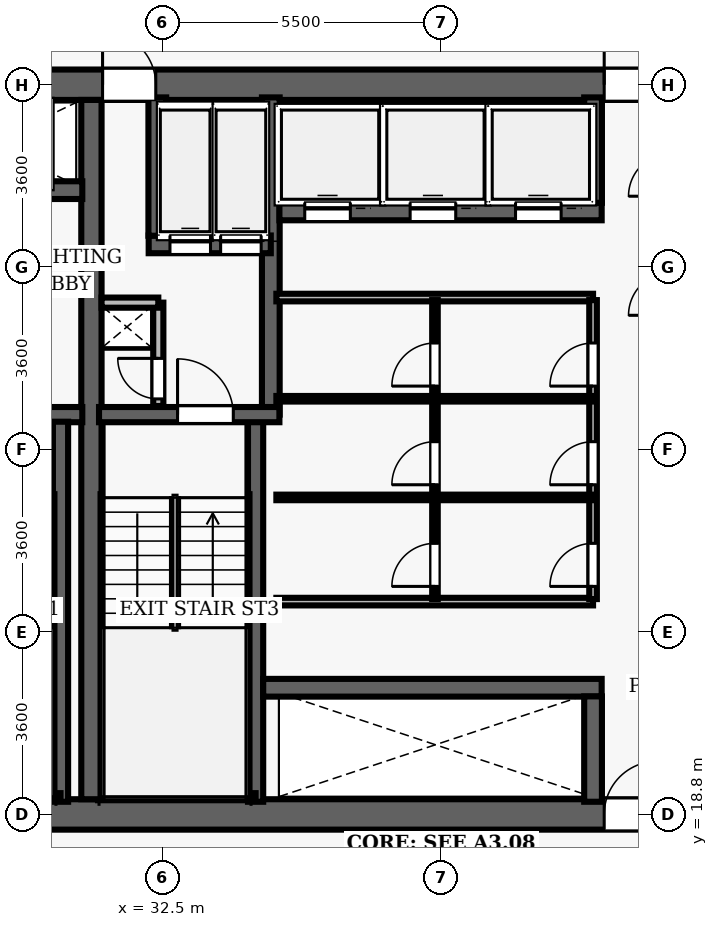
"""IFC4 building model, lengths in metres.
Left out: names, types, materials, properties, quantities, classifications, styles, units other than length and angle.
Written with IfcOpenShell. Run it as: python <this file> out.ifc"""

import sys

from ifc_helpers import new_model, si_unit, direction, frame, frame_2d, origin, place, context, subcontext, project, spatial, rectangle, extrude, element, fill, save


model = new_model("IFC4")
c1 = context("Model", 3, precision=1e-05, world=origin(), true_north=direction((0.0, 1.0)))
c2 = subcontext(c1, "Body", "Model", "MODEL_VIEW")
j1 = project(units=[si_unit("LENGTHUNIT", "METRE"), si_unit("PLANEANGLEUNIT", "RADIAN")], contexts=[c1])
p1 = place(None, origin())
s1 = spatial("IfcSite", under=j1, at=p1, CompositionType="ELEMENT")
p2 = place(p1, origin())
s2 = spatial("IfcBuilding", under=s1, at=p2, CompositionType="ELEMENT")
p3 = place(p2, frame((0.0, 0.0, 69.4)))
s3 = spatial("IfcBuildingStorey", under=s2, at=p3, CompositionType="ELEMENT", Elevation=69.4)
p4 = place(p3, frame((26.7, 18.8, 0.0), z_axis=(0.0, 0.0, 1.0), x_axis=(1.0, 0.0, 0.0)))
e1 = element("IfcWall", 1, at=p4, inside=s3, PredefinedType="SHEAR", context=c2, shape_type="SweptSolid", body=[
    extrude(rectangle(XDim=22.6, YDim=0.6, at=frame_2d((11.3, 0.0))), origin(), (0.0, 0.0, 1.0), 3.5),
])
p5 = place(p4, frame((14.52, 0.0, 0.0)))
e2 = element("IfcOpeningElement", 2, at=p5, cuts=e1, PredefinedType="OPENING", context=c2, shape_type="SweptSolid", body=[
    extrude(rectangle(XDim=1.05, YDim=2.15, at=frame_2d((0.525, 1.075))), frame((0.0, 0.31, 0.0), z_axis=(0.0, -1.0, 0.0), x_axis=(1.0, 0.0, 0.0)), (0.0, 0.0, 1.0), 0.62),
])
p6 = place(p3, frame((26.7, 33.2, 0.0), z_axis=(0.0, 0.0, 1.0), x_axis=(1.0, 0.0, 0.0)))
e3 = element("IfcWall", 3, at=p6, inside=s3, PredefinedType="SHEAR", context=c2, shape_type="SweptSolid", body=[
    extrude(rectangle(XDim=22.6, YDim=0.6, at=frame_2d((11.3, 0.0))), origin(), (0.0, 0.0, 1.0), 3.5),
])
p7 = place(p6, frame((4.62, 0.0, 0.0)))
e4 = element("IfcOpeningElement", 4, at=p7, cuts=e3, PredefinedType="OPENING", context=c2, shape_type="SweptSolid", body=[
    extrude(rectangle(XDim=1.05, YDim=2.15, at=frame_2d((0.525, 1.075))), frame((0.0, 0.31, 0.0), z_axis=(0.0, -1.0, 0.0), x_axis=(1.0, 0.0, 0.0)), (0.0, 0.0, 1.0), 0.62),
])
p8 = place(p6, frame((14.52, 0.0, 0.0)))
e5 = element("IfcOpeningElement", 5, at=p8, cuts=e3, PredefinedType="OPENING", context=c2, shape_type="SweptSolid", body=[
    extrude(rectangle(XDim=1.05, YDim=2.15, at=frame_2d((0.525, 1.075))), frame((0.0, 0.31, 0.0), z_axis=(0.0, -1.0, 0.0), x_axis=(1.0, 0.0, 0.0)), (0.0, 0.0, 1.0), 0.62),
])
p9 = place(p3, frame((31.1, 19.1, 0.0), z_axis=(0.0, 0.0, 1.0), x_axis=(0.0, 1.0, 0.0)))
e6 = element("IfcWall", 6, at=p9, inside=s3, PredefinedType="SHEAR", context=c2, shape_type="SweptSolid", body=[
    extrude(rectangle(XDim=13.8, YDim=0.4, at=frame_2d((6.9, 0.0))), origin(), (0.0, 0.0, 1.0), 3.5),
])
p10 = place(p3, frame((27.25, 26.69, 0.0), z_axis=(0.0, 0.0, 1.0), x_axis=(1.0, 0.0, 0.0)))
e7 = element("IfcWall", 7, at=p10, inside=s3, PredefinedType="SHEAR", context=c2, shape_type="SweptSolid", body=[
    extrude(rectangle(XDim=3.67, YDim=0.3, at=frame_2d((1.835, 0.0))), origin(), (0.0, 0.0, 1.0), 3.5),
])
p11 = place(p10, frame((1.05, 0.0, 0.0)))
e8 = element("IfcOpeningElement", 8, at=p11, cuts=e7, PredefinedType="OPENING", context=c2, shape_type="SweptSolid", body=[
    extrude(rectangle(XDim=1.1, YDim=2.15, at=frame_2d((0.55, 1.075))), frame((0.0, 0.16, 0.0), z_axis=(0.0, -1.0, 0.0), x_axis=(1.0, 0.0, 0.0)), (0.0, 0.0, 1.0), 0.32),
])
p12 = place(p3, frame((30.49, 19.05, 0.0), z_axis=(0.0, 0.0, 1.0), x_axis=(0.0, 1.0, 0.0)))
e9 = element("IfcWall", 9, at=p12, inside=s3, PredefinedType="SHEAR", context=c2, shape_type="SweptSolid", body=[
    extrude(rectangle(XDim=7.5, YDim=0.3, at=frame_2d((3.75, 0.0))), origin(), (0.0, 0.0, 1.0), 3.5),
])
p13 = place(p3, frame((27.395, 19.16, 0.0), z_axis=(0.0, 0.0, 1.0), x_axis=(1.0, 0.0, 0.0)))
e10 = element("IfcWall", 10, at=p13, inside=s3, PredefinedType="SHEAR", context=c2, shape_type="SweptSolid", body=[
    extrude(rectangle(XDim=3.095, YDim=0.12, at=frame_2d((1.547, 0.0))), origin(), (0.0, 0.0, 1.0), 3.5),
])
p14 = place(p3, frame((27.25, 31.12, 0.0), z_axis=(0.0, 0.0, 1.0), x_axis=(1.0, 0.0, 0.0)))
e11 = element("IfcWall", 11, at=p14, inside=s3, PredefinedType="SHEAR", context=c2, shape_type="SweptSolid", body=[
    extrude(rectangle(XDim=3.67, YDim=0.35, at=frame_2d((1.835, 0.0))), origin(), (0.0, 0.0, 1.0), 2.6),
])
p15 = place(p14, frame((1.25, 0.0, 0.0)))
e12 = element("IfcOpeningElement", 12, at=p15, cuts=e11, PredefinedType="OPENING", context=c2, shape_type="SweptSolid", body=[
    extrude(rectangle(XDim=1.1, YDim=2.15, at=frame_2d((0.55, 1.075))), frame((0.0, 0.185, 0.0), z_axis=(0.0, -1.0, 0.0), x_axis=(1.0, 0.0, 0.0)), (0.0, 0.0, 1.0), 0.37),
])
p16 = place(p3, frame((34.34, 19.05, 0.0), z_axis=(0.0, 0.0, 1.0), x_axis=(0.0, 1.0, 0.0)))
e13 = element("IfcWall", 13, at=p16, inside=s3, PredefinedType="SHEAR", context=c2, shape_type="SweptSolid", body=[
    extrude(rectangle(XDim=7.5, YDim=0.3, at=frame_2d((3.75, 0.0))), origin(), (0.0, 0.0, 1.0), 3.5),
])
p17 = place(p3, frame((34.64, 26.69, 0.0), z_axis=(0.0, 0.0, 1.0), x_axis=(0.0, 1.0, 0.0)))
e14 = element("IfcWall", 14, at=p17, inside=s3, PredefinedType="SHEAR", context=c2, shape_type="SweptSolid", body=[
    extrude(rectangle(XDim=6.26, YDim=0.35, at=frame_2d((3.13, 0.0))), origin(), (0.0, 0.0, 1.0), 3.5),
])
p18 = place(p3, frame((31.25, 26.69, 0.0), z_axis=(0.0, 0.0, 1.0), x_axis=(1.0, 0.0, 0.0)))
e15 = element("IfcWall", 15, at=p18, inside=s3, PredefinedType="SHEAR", context=c2, shape_type="SweptSolid", body=[
    extrude(rectangle(XDim=3.56, YDim=0.3, at=frame_2d((1.78, 0.0))), origin(), (0.0, 0.0, 1.0), 3.5),
])
p19 = place(p18, frame((1.55, 0.0, 0.0)))
e16 = element("IfcOpeningElement", 16, at=p19, cuts=e15, PredefinedType="OPENING", context=c2, shape_type="SweptSolid", body=[
    extrude(rectangle(XDim=1.1, YDim=2.15, at=frame_2d((0.55, 1.075))), frame((0.0, 0.16, 0.0), z_axis=(0.0, -1.0, 0.0), x_axis=(1.0, 0.0, 0.0)), (0.0, 0.0, 1.0), 0.32),
])
p20 = place(p3, frame((31.3, 19.16, 0.0), z_axis=(0.0, 0.0, 1.0), x_axis=(1.0, 0.0, 0.0)))
e17 = element("IfcWall", 17, at=p20, inside=s3, PredefinedType="SHEAR", context=c2, shape_type="SweptSolid", body=[
    extrude(rectangle(XDim=3.04, YDim=0.12, at=frame_2d((1.52, 0.0))), origin(), (0.0, 0.0, 1.0), 3.5),
])
p21 = place(p3, frame((32.23, 30.05, 0.0), z_axis=(0.0, 0.0, 1.0), x_axis=(1.0, 0.0, 0.0)))
e18 = element("IfcWall", 18, at=p21, inside=s3, PredefinedType="SHEAR", context=c2, shape_type="SweptSolid", body=[
    extrude(rectangle(XDim=2.41, YDim=0.35, at=frame_2d((1.205, 0.0))), origin(), (0.0, 0.0, 1.0), 2.6),
])
p22 = place(p21, frame((0.42, 0.0, 0.0)))
e19 = element("IfcOpeningElement", 19, at=p22, cuts=e18, PredefinedType="OPENING", context=c2, shape_type="SweptSolid", body=[
    extrude(rectangle(XDim=0.8, YDim=2.15, at=frame_2d((0.4, 1.075))), frame((0.0, 0.185, 0.0), z_axis=(0.0, -1.0, 0.0), x_axis=(1.0, 0.0, 0.0)), (0.0, 0.0, 1.0), 0.37),
])
p23 = place(p21, frame((1.42, 0.0, 0.0)))
e20 = element("IfcOpeningElement", 20, at=p23, cuts=e18, PredefinedType="OPENING", context=c2, shape_type="SweptSolid", body=[
    extrude(rectangle(XDim=0.8, YDim=2.15, at=frame_2d((0.4, 1.075))), frame((0.0, 0.185, 0.0), z_axis=(0.0, -1.0, 0.0), x_axis=(1.0, 0.0, 0.0)), (0.0, 0.0, 1.0), 0.37),
])
p24 = place(p3, frame((32.4, 30.22, 0.0), z_axis=(0.0, 0.0, 1.0), x_axis=(0.0, 1.0, 0.0)))
e21 = element("IfcWall", 21, at=p24, inside=s3, PredefinedType="SHEAR", context=c2, shape_type="SweptSolid", body=[
    extrude(rectangle(XDim=2.73, YDim=0.35, at=frame_2d((1.365, 0.0))), origin(), (0.0, 0.0, 1.0), 2.6),
])
p25 = place(p3, frame((32.42, 26.86, 0.0), z_axis=(0.0, 0.0, 1.0), x_axis=(0.0, 1.0, 0.0)))
e22 = element("IfcWall", 22, at=p25, inside=s3, PredefinedType="PARTITIONING", context=c2, shape_type="SweptSolid", body=[
    extrude(rectangle(XDim=2.04, YDim=0.2, at=frame_2d((1.02, 0.0))), origin(), (0.0, 0.0, 1.0), 2.6),
])
p26 = place(p25, frame((0.14, 0.0, 0.0)))
e23 = element("IfcOpeningElement", 23, at=p26, cuts=e22, PredefinedType="OPENING", context=c2, shape_type="SweptSolid", body=[
    extrude(rectangle(XDim=0.8, YDim=2.05, at=frame_2d((0.4, 1.025))), frame((0.0, 0.11, 0.0), z_axis=(0.0, -1.0, 0.0), x_axis=(1.0, 0.0, 0.0)), (0.0, 0.0, 1.0), 0.22),
])
p27 = place(p3, frame((31.3, 28.9, 0.0), z_axis=(0.0, 0.0, 1.0), x_axis=(1.0, 0.0, 0.0)))
e24 = element("IfcWall", 24, at=p27, inside=s3, PredefinedType="PARTITIONING", context=c2, shape_type="SweptSolid", body=[
    extrude(rectangle(XDim=1.12, YDim=0.2, at=frame_2d((0.56, 0.0))), origin(), (0.0, 0.0, 1.0), 2.6),
])
p28 = place(p3, frame((34.81, 30.7, 0.0), z_axis=(0.0, 0.0, 1.0), x_axis=(1.0, 0.0, 0.0)))
e25 = element("IfcWall", 25, at=p28, inside=s3, PredefinedType="SHEAR", context=c2, shape_type="SweptSolid", body=[
    extrude(rectangle(XDim=6.36, YDim=0.35, at=frame_2d((3.18, 0.0))), origin(), (0.0, 0.0, 1.0), 2.6),
])
p29 = place(p28, frame((0.5, 0.0, 0.0)))
e26 = element("IfcOpeningElement", 26, at=p29, cuts=e25, PredefinedType="OPENING", context=c2, shape_type="SweptSolid", body=[
    extrude(rectangle(XDim=0.9, YDim=2.15, at=frame_2d((0.45, 1.075))), frame((0.0, 0.185, 0.0), z_axis=(0.0, -1.0, 0.0), x_axis=(1.0, 0.0, 0.0)), (0.0, 0.0, 1.0), 0.37),
])
p30 = place(p28, frame((2.58, 0.0, 0.0)))
e27 = element("IfcOpeningElement", 27, at=p30, cuts=e25, PredefinedType="OPENING", context=c2, shape_type="SweptSolid", body=[
    extrude(rectangle(XDim=0.9, YDim=2.15, at=frame_2d((0.45, 1.075))), frame((0.0, 0.185, 0.0), z_axis=(0.0, -1.0, 0.0), x_axis=(1.0, 0.0, 0.0)), (0.0, 0.0, 1.0), 0.37),
])
p31 = place(p28, frame((4.66, 0.0, 0.0)))
e28 = element("IfcOpeningElement", 28, at=p31, cuts=e25, PredefinedType="OPENING", context=c2, shape_type="SweptSolid", body=[
    extrude(rectangle(XDim=0.9, YDim=2.15, at=frame_2d((0.45, 1.075))), frame((0.0, 0.185, 0.0), z_axis=(0.0, -1.0, 0.0), x_axis=(1.0, 0.0, 0.0)), (0.0, 0.0, 1.0), 0.37),
])
p32 = place(p3, frame((41.0, 30.87, 0.0), z_axis=(0.0, 0.0, 1.0), x_axis=(0.0, 1.0, 0.0)))
e29 = element("IfcWall", 29, at=p32, inside=s3, PredefinedType="SHEAR", context=c2, shape_type="SweptSolid", body=[
    extrude(rectangle(XDim=2.08, YDim=0.35, at=frame_2d((1.04, 0.0))), origin(), (0.0, 0.0, 1.0), 2.6),
])
p33 = place(p3, frame((34.49, 21.3, 0.0), z_axis=(0.0, 0.0, 1.0), x_axis=(1.0, 0.0, 0.0)))
e30 = element("IfcWall", 30, at=p33, inside=s3, PredefinedType="SHEAR", context=c2, shape_type="SweptSolid", body=[
    extrude(rectangle(XDim=6.68, YDim=0.35, at=frame_2d((3.34, 0.0))), origin(), (0.0, 0.0, 1.0), 2.6),
])
p34 = place(p3, frame((41.0, 19.05, 0.0), z_axis=(0.0, 0.0, 1.0), x_axis=(0.0, 1.0, 0.0)))
e31 = element("IfcWall", 31, at=p34, inside=s3, PredefinedType="SHEAR", context=c2, shape_type="SweptSolid", body=[
    extrude(rectangle(XDim=2.08, YDim=0.35, at=frame_2d((1.04, 0.0))), origin(), (0.0, 0.0, 1.0), 2.6),
])
for number, where, z_axis, x_axis in (
    (32, (34.75, 29.0, 0.0), (0.0, 0.0, 1.0), (1.0, 0.0, 0.0)),
    (33, (34.75, 23.0, 0.0), (0.0, 0.0, 1.0), (1.0, 0.0, 0.0)),
):
    element("IfcWall", number, at=place(p3, frame(where, z_axis=z_axis, x_axis=x_axis)), inside=s3, PredefinedType="PARTITIONING", context=c2, shape_type="SweptSolid", body=[
        extrude(rectangle(XDim=6.25, YDim=0.15, at=frame_2d((3.125, 0.0))), origin(), (0.0, 0.0, 1.0), 2.6),
    ])
p35 = place(p3, frame((41.0, 23.05, 0.0), z_axis=(0.0, 0.0, 1.0), x_axis=(0.0, 1.0, 0.0)))
e34 = element("IfcWall", 34, at=p35, inside=s3, PredefinedType="PARTITIONING", context=c2, shape_type="SweptSolid", body=[
    extrude(rectangle(XDim=5.9, YDim=0.15, at=frame_2d((2.95, 0.0))), origin(), (0.0, 0.0, 1.0), 2.6),
])
p36 = place(p35, frame((0.25, 0.0, 0.0)))
e35 = element("IfcOpeningElement", 35, at=p36, cuts=e34, PredefinedType="OPENING", context=c2, shape_type="SweptSolid", body=[
    extrude(rectangle(XDim=0.85, YDim=2.1, at=frame_2d((0.425, 1.05))), frame((0.0, 0.085, 0.0), z_axis=(0.0, -1.0, 0.0), x_axis=(1.0, 0.0, 0.0)), (0.0, 0.0, 1.0), 0.17),
])
p37 = place(p35, frame((2.256, 0.0, 0.0)))
e36 = element("IfcOpeningElement", 36, at=p37, cuts=e34, PredefinedType="OPENING", context=c2, shape_type="SweptSolid", body=[
    extrude(rectangle(XDim=0.85, YDim=2.1, at=frame_2d((0.425, 1.05))), frame((0.0, 0.085, 0.0), z_axis=(0.0, -1.0, 0.0), x_axis=(1.0, 0.0, 0.0)), (0.0, 0.0, 1.0), 0.17),
])
p38 = place(p35, frame((4.203, 0.0, 0.0)))
e37 = element("IfcOpeningElement", 37, at=p38, cuts=e34, PredefinedType="OPENING", context=c2, shape_type="SweptSolid", body=[
    extrude(rectangle(XDim=0.85, YDim=2.1, at=frame_2d((0.425, 1.05))), frame((0.0, 0.085, 0.0), z_axis=(0.0, -1.0, 0.0), x_axis=(1.0, 0.0, 0.0)), (0.0, 0.0, 1.0), 0.17),
])
p39 = place(p3, frame((37.88, 23.05, 0.0), z_axis=(0.0, 0.0, 1.0), x_axis=(0.0, 1.0, 0.0)))
e38 = element("IfcWall", 38, at=p39, inside=s3, PredefinedType="PARTITIONING", context=c2, shape_type="SweptSolid", body=[
    extrude(rectangle(XDim=5.9, YDim=0.11, at=frame_2d((2.95, 0.0))), origin(), (0.0, 0.0, 1.0), 2.6),
])
p40 = place(p39, frame((0.25, 0.0, 0.0)))
e39 = element("IfcOpeningElement", 39, at=p40, cuts=e38, PredefinedType="OPENING", context=c2, shape_type="SweptSolid", body=[
    extrude(rectangle(XDim=0.85, YDim=2.1, at=frame_2d((0.425, 1.05))), frame((0.0, 0.065, 0.0), z_axis=(0.0, -1.0, 0.0), x_axis=(1.0, 0.0, 0.0)), (0.0, 0.0, 1.0), 0.13),
])
p41 = place(p39, frame((2.256, 0.0, 0.0)))
e40 = element("IfcOpeningElement", 40, at=p41, cuts=e38, PredefinedType="OPENING", context=c2, shape_type="SweptSolid", body=[
    extrude(rectangle(XDim=0.85, YDim=2.1, at=frame_2d((0.425, 1.05))), frame((0.0, 0.065, 0.0), z_axis=(0.0, -1.0, 0.0), x_axis=(1.0, 0.0, 0.0)), (0.0, 0.0, 1.0), 0.13),
])
p42 = place(p39, frame((4.203, 0.0, 0.0)))
e41 = element("IfcOpeningElement", 41, at=p42, cuts=e38, PredefinedType="OPENING", context=c2, shape_type="SweptSolid", body=[
    extrude(rectangle(XDim=0.85, YDim=2.1, at=frame_2d((0.425, 1.05))), frame((0.0, 0.065, 0.0), z_axis=(0.0, -1.0, 0.0), x_axis=(1.0, 0.0, 0.0)), (0.0, 0.0, 1.0), 0.13),
])
for number, where, z_axis, x_axis in (
    (42, (34.75, 25.056, 0.0), (0.0, 0.0, 1.0), (1.0, 0.0, 0.0)),
    (43, (34.75, 27.003, 0.0), (0.0, 0.0, 1.0), (1.0, 0.0, 0.0)),
):
    element("IfcWall", number, at=place(p3, frame(where, z_axis=z_axis, x_axis=x_axis)), inside=s3, PredefinedType="PARTITIONING", context=c2, shape_type="SweptSolid", body=[
        extrude(rectangle(XDim=6.25, YDim=0.11, at=frame_2d((3.125, 0.0))), origin(), (0.0, 0.0, 1.0), 2.6),
    ])
p43 = place(p19, origin())
e44 = element("IfcDoor", 44, at=p43, inside=s3, OperationType="SINGLE_SWING_LEFT", PredefinedType="DOOR", context=c2, shape_type="SweptSolid", body=[
    extrude(rectangle(XDim=1.1, YDim=2.15, at=frame_2d((0.55, 1.075))), frame((0.0, 0.025, 0.0), z_axis=(0.0, -1.0, 0.0), x_axis=(1.0, 0.0, 0.0)), (0.0, 0.0, 1.0), 0.05),
])
fill(e16, e44)
p44 = place(p26, origin())
e45 = element("IfcDoor", 45, at=p44, inside=s3, OperationType="SINGLE_SWING_RIGHT", PredefinedType="DOOR", context=c2, shape_type="SweptSolid", body=[
    extrude(rectangle(XDim=0.8, YDim=2.05, at=frame_2d((0.4, 1.025))), frame((0.0, 0.025, 0.0), z_axis=(0.0, -1.0, 0.0), x_axis=(1.0, 0.0, 0.0)), (0.0, 0.0, 1.0), 0.05),
])
fill(e23, e45)
p45 = place(p7, origin())
e46 = element("IfcDoor", 46, at=p45, inside=s3, OperationType="SINGLE_SWING_LEFT", PredefinedType="DOOR", context=c2, shape_type="SweptSolid", body=[
    extrude(rectangle(XDim=1.05, YDim=2.15, at=frame_2d((0.525, 1.075))), frame((0.0, 0.025, 0.0), z_axis=(0.0, -1.0, 0.0), x_axis=(1.0, 0.0, 0.0)), (0.0, 0.0, 1.0), 0.05),
])
fill(e4, e46)
p46 = place(p8, origin())
e47 = element("IfcDoor", 47, at=p46, inside=s3, OperationType="SINGLE_SWING_LEFT", PredefinedType="DOOR", context=c2, shape_type="SweptSolid", body=[
    extrude(rectangle(XDim=1.05, YDim=2.15, at=frame_2d((0.525, 1.075))), frame((0.0, 0.025, 0.0), z_axis=(0.0, -1.0, 0.0), x_axis=(1.0, 0.0, 0.0)), (0.0, 0.0, 1.0), 0.05),
])
fill(e5, e47)
p47 = place(p5, origin())
e48 = element("IfcDoor", 48, at=p47, inside=s3, OperationType="SINGLE_SWING_RIGHT", PredefinedType="DOOR", context=c2, shape_type="SweptSolid", body=[
    extrude(rectangle(XDim=1.05, YDim=2.15, at=frame_2d((0.525, 1.075))), frame((0.0, 0.025, 0.0), z_axis=(0.0, -1.0, 0.0), x_axis=(1.0, 0.0, 0.0)), (0.0, 0.0, 1.0), 0.05),
])
fill(e2, e48)
p48 = place(p36, origin())
e49 = element("IfcDoor", 49, at=p48, inside=s3, OperationType="SINGLE_SWING_LEFT", PredefinedType="DOOR", context=c2, shape_type="SweptSolid", body=[
    extrude(rectangle(XDim=0.85, YDim=2.1, at=frame_2d((0.425, 1.05))), frame((0.0, 0.025, 0.0), z_axis=(0.0, -1.0, 0.0), x_axis=(1.0, 0.0, 0.0)), (0.0, 0.0, 1.0), 0.05),
])
fill(e35, e49)
p49 = place(p40, origin())
e50 = element("IfcDoor", 50, at=p49, inside=s3, OperationType="SINGLE_SWING_LEFT", PredefinedType="DOOR", context=c2, shape_type="SweptSolid", body=[
    extrude(rectangle(XDim=0.85, YDim=2.1, at=frame_2d((0.425, 1.05))), frame((0.0, 0.025, 0.0), z_axis=(0.0, -1.0, 0.0), x_axis=(1.0, 0.0, 0.0)), (0.0, 0.0, 1.0), 0.05),
])
fill(e39, e50)
p50 = place(p37, origin())
e51 = element("IfcDoor", 51, at=p50, inside=s3, OperationType="SINGLE_SWING_LEFT", PredefinedType="DOOR", context=c2, shape_type="SweptSolid", body=[
    extrude(rectangle(XDim=0.85, YDim=2.1, at=frame_2d((0.425, 1.05))), frame((0.0, 0.025, 0.0), z_axis=(0.0, -1.0, 0.0), x_axis=(1.0, 0.0, 0.0)), (0.0, 0.0, 1.0), 0.05),
])
fill(e36, e51)
p51 = place(p41, origin())
e52 = element("IfcDoor", 52, at=p51, inside=s3, OperationType="SINGLE_SWING_LEFT", PredefinedType="DOOR", context=c2, shape_type="SweptSolid", body=[
    extrude(rectangle(XDim=0.85, YDim=2.1, at=frame_2d((0.425, 1.05))), frame((0.0, 0.025, 0.0), z_axis=(0.0, -1.0, 0.0), x_axis=(1.0, 0.0, 0.0)), (0.0, 0.0, 1.0), 0.05),
])
fill(e40, e52)
p52 = place(p38, origin())
e53 = element("IfcDoor", 53, at=p52, inside=s3, OperationType="SINGLE_SWING_LEFT", PredefinedType="DOOR", context=c2, shape_type="SweptSolid", body=[
    extrude(rectangle(XDim=0.85, YDim=2.1, at=frame_2d((0.425, 1.05))), frame((0.0, 0.025, 0.0), z_axis=(0.0, -1.0, 0.0), x_axis=(1.0, 0.0, 0.0)), (0.0, 0.0, 1.0), 0.05),
])
fill(e37, e53)
p53 = place(p42, origin())
e54 = element("IfcDoor", 54, at=p53, inside=s3, OperationType="SINGLE_SWING_LEFT", PredefinedType="DOOR", context=c2, shape_type="SweptSolid", body=[
    extrude(rectangle(XDim=0.85, YDim=2.1, at=frame_2d((0.425, 1.05))), frame((0.0, 0.025, 0.0), z_axis=(0.0, -1.0, 0.0), x_axis=(1.0, 0.0, 0.0)), (0.0, 0.0, 1.0), 0.05),
])
fill(e41, e54)
p54 = place(p29, origin())
e55 = element("IfcDoor", 55, at=p54, inside=s3, OperationType="SLIDING_TO_LEFT", PredefinedType="DOOR", context=c2, shape_type="SweptSolid", body=[
    extrude(rectangle(XDim=0.9, YDim=2.15, at=frame_2d((0.45, 1.075))), frame((0.0, 0.025, 0.0), z_axis=(0.0, -1.0, 0.0), x_axis=(1.0, 0.0, 0.0)), (0.0, 0.0, 1.0), 0.05),
])
fill(e26, e55)
p55 = place(p30, origin())
e56 = element("IfcDoor", 56, at=p55, inside=s3, OperationType="SLIDING_TO_LEFT", PredefinedType="DOOR", context=c2, shape_type="SweptSolid", body=[
    extrude(rectangle(XDim=0.9, YDim=2.15, at=frame_2d((0.45, 1.075))), frame((0.0, 0.025, 0.0), z_axis=(0.0, -1.0, 0.0), x_axis=(1.0, 0.0, 0.0)), (0.0, 0.0, 1.0), 0.05),
])
fill(e27, e56)
p56 = place(p31, origin())
e57 = element("IfcDoor", 57, at=p56, inside=s3, OperationType="SLIDING_TO_LEFT", PredefinedType="DOOR", context=c2, shape_type="SweptSolid", body=[
    extrude(rectangle(XDim=0.9, YDim=2.15, at=frame_2d((0.45, 1.075))), frame((0.0, 0.025, 0.0), z_axis=(0.0, -1.0, 0.0), x_axis=(1.0, 0.0, 0.0)), (0.0, 0.0, 1.0), 0.05),
])
fill(e28, e57)
p57 = place(p22, origin())
e58 = element("IfcDoor", 58, at=p57, inside=s3, OperationType="SLIDING_TO_LEFT", PredefinedType="DOOR", context=c2, shape_type="SweptSolid", body=[
    extrude(rectangle(XDim=0.8, YDim=2.15, at=frame_2d((0.4, 1.075))), frame((0.0, 0.025, 0.0), z_axis=(0.0, -1.0, 0.0), x_axis=(1.0, 0.0, 0.0)), (0.0, 0.0, 1.0), 0.05),
])
fill(e19, e58)
p58 = place(p23, origin())
e59 = element("IfcDoor", 59, at=p58, inside=s3, OperationType="SLIDING_TO_LEFT", PredefinedType="DOOR", context=c2, shape_type="SweptSolid", body=[
    extrude(rectangle(XDim=0.8, YDim=2.15, at=frame_2d((0.4, 1.075))), frame((0.0, 0.025, 0.0), z_axis=(0.0, -1.0, 0.0), x_axis=(1.0, 0.0, 0.0)), (0.0, 0.0, 1.0), 0.05),
])
fill(e20, e59)
save(model, sys.argv[1])
